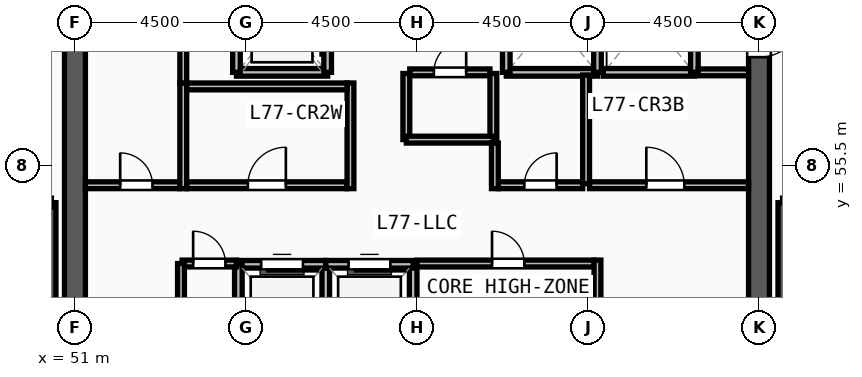
"""IFC4 building model, lengths in metres.
Left out: names, types, materials, properties, quantities, classifications, styles, units other than length and angle.
Written with IfcOpenShell. Run it as: python <this file> out.ifc"""

import sys

from ifc_helpers import new_model, si_unit, direction, frame, frame_2d, origin, place, context, subcontext, project, spatial, rectangle, extrude, source, transform, mapped, element, fill, save


model = new_model("IFC4")
c1 = context("Model", 3, precision=1e-05, world=origin(), true_north=direction((0.0, 1.0)))
c2 = subcontext(c1, "Body", "Model", "MODEL_VIEW")
j1 = project(units=[si_unit("LENGTHUNIT", "METRE"), si_unit("PLANEANGLEUNIT", "RADIAN")], contexts=[c1])
p1 = place(None, origin())
s1 = spatial("IfcSite", under=j1, at=p1, CompositionType="ELEMENT")
p2 = place(p1, origin())
s2 = spatial("IfcBuilding", under=s1, at=p2, CompositionType="ELEMENT")
p3 = place(p2, frame((0.0, 0.0, 297.75)))
s3 = spatial("IfcBuildingStorey", under=s2, at=p3, CompositionType="ELEMENT", Elevation=297.75)
p4 = place(p3, frame((69.0, 60.9, 0.0), z_axis=(0.0, 0.0, 1.0), x_axis=(0.0, -1.0, 0.0)))
e1 = element("IfcWall", 1, at=p4, inside=s3, PredefinedType="SHEAR", context=c2, shape_type="SweptSolid", body=[
    extrude(rectangle(XDim=13.8, YDim=0.55, at=frame_2d((6.9, 0.0))), origin(), (0.0, 0.0, 1.0), 3.57),
])
m1 = source(origin(), c2, "Body", "SweptSolid", [
    extrude(rectangle(XDim=1.2, YDim=2.2, at=frame_2d((0.6, 1.1))), frame((0.0, 0.285, 0.0), z_axis=(0.0, -1.0, 0.0), x_axis=(1.0, 0.0, 0.0)), (0.0, 0.0, 1.0), 0.57),
])
p5 = place(p4, frame((1.35, 0.0, 0.0)))
e2 = element("IfcOpeningElement", 2, at=p5, cuts=e1, PredefinedType="OPENING", context=c2, shape_type="MappedRepresentation", body=[
    mapped(m1, transform((0.0, 0.0, 0.0), x_axis=(1.0, 0.0, 0.0), y_axis=(0.0, 1.0, 0.0), z_axis=(0.0, 0.0, 1.0), scale=1.0)),
])
p6 = place(p3, frame((51.0, 47.1, 0.0), z_axis=(0.0, 0.0, 1.0), x_axis=(0.0, 1.0, 0.0)))
e3 = element("IfcWall", 3, at=p6, inside=s3, PredefinedType="SHEAR", context=c2, shape_type="SweptSolid", body=[
    extrude(rectangle(XDim=13.8, YDim=0.55, at=frame_2d((6.9, 0.0))), origin(), (0.0, 0.0, 1.0), 3.57),
])
for number, where, z_axis, x_axis in (
    (4, (50.38, 46.7, 0.0), (0.0, 0.0, 1.0), (0.0, 1.0, 0.0)),
    (5, (69.62, 54.52, 0.0), (0.0, 0.0, 1.0), (0.0, -1.0, 0.0)),
):
    element("IfcWall", number, at=place(p3, frame(where, z_axis=z_axis, x_axis=x_axis)), inside=s3, PredefinedType="SOLIDWALL", context=c2, shape_type="SweptSolid", body=[
        extrude(rectangle(XDim=7.82, YDim=0.24, at=frame_2d((3.91, 0.0))), origin(), (0.0, 0.0, 1.0), 3.57),
    ])
p7 = place(p3, frame((55.25, 57.95, 0.0), z_axis=(0.0, 0.0, 1.0), x_axis=(1.0, 0.0, 0.0)))
e6 = element("IfcWall", 6, at=p7, inside=s3, PredefinedType="SOLIDWALL", context=c2, shape_type="SweptSolid", body=[
    extrude(rectangle(XDim=2.4, YDim=0.2, at=frame_2d((1.2, 0.0))), origin(), (0.0, 0.0, 1.0), 3.57),
])
p8 = place(p3, frame((57.65, 57.95, 0.0), z_axis=(0.0, 0.0, 1.0), x_axis=(0.0, 1.0, 0.0)))
e7 = element("IfcWall", 7, at=p8, inside=s3, PredefinedType="SOLIDWALL", context=c2, shape_type="SweptSolid", body=[
    extrude(rectangle(XDim=2.93, YDim=0.2, at=frame_2d((1.465, 0.0))), origin(), (0.0, 0.0, 1.0), 3.57),
])
m2 = source(origin(), c2, "Body", "SweptSolid", [
    extrude(rectangle(XDim=1.2, YDim=2.3, at=frame_2d((0.6, 1.15))), frame((0.0, 0.11, 0.0), z_axis=(0.0, -1.0, 0.0), x_axis=(1.0, 0.0, 0.0)), (0.0, 0.0, 1.0), 0.22),
])
p9 = place(p8, frame((0.865, 0.0, 0.0)))
e8 = element("IfcOpeningElement", 8, at=p9, cuts=e7, PredefinedType="OPENING", context=c2, shape_type="MappedRepresentation", body=[
    mapped(m2, transform((0.0, 0.0, 0.0), x_axis=(1.0, 0.0, 0.0), y_axis=(0.0, 1.0, 0.0), z_axis=(0.0, 0.0, 1.0), scale=1.0)),
])
p10 = place(p3, frame((55.25, 60.88, 0.0), z_axis=(0.0, 0.0, 1.0), x_axis=(0.0, -1.0, 0.0)))
e9 = element("IfcWall", 9, at=p10, inside=s3, PredefinedType="SOLIDWALL", context=c2, shape_type="SweptSolid", body=[
    extrude(rectangle(XDim=2.93, YDim=0.2, at=frame_2d((1.465, 0.0))), origin(), (0.0, 0.0, 1.0), 3.57),
])
p11 = place(p3, frame((62.35, 57.95, 0.0), z_axis=(0.0, 0.0, 1.0), x_axis=(1.0, 0.0, 0.0)))
e10 = element("IfcWall", 10, at=p11, inside=s3, PredefinedType="SOLIDWALL", context=c2, shape_type="SweptSolid", body=[
    extrude(rectangle(XDim=2.4, YDim=0.2, at=frame_2d((1.2, 0.0))), origin(), (0.0, 0.0, 1.0), 3.57),
])
for number, where, z_axis, x_axis in (
    (11, (64.75, 57.95, 0.0), (0.0, 0.0, 1.0), (0.0, 1.0, 0.0)),
    (12, (62.35, 60.88, 0.0), (0.0, 0.0, 1.0), (0.0, -1.0, 0.0)),
):
    element("IfcWall", number, at=place(p3, frame(where, z_axis=z_axis, x_axis=x_axis)), inside=s3, PredefinedType="SOLIDWALL", context=c2, shape_type="SweptSolid", body=[
        extrude(rectangle(XDim=2.93, YDim=0.2, at=frame_2d((1.465, 0.0))), origin(), (0.0, 0.0, 1.0), 3.57),
    ])
p12 = place(p3, frame((64.9, 57.95, 0.0), z_axis=(0.0, 0.0, 1.0), x_axis=(1.0, 0.0, 0.0)))
e13 = element("IfcWall", 13, at=p12, inside=s3, PredefinedType="SOLIDWALL", context=c2, shape_type="SweptSolid", body=[
    extrude(rectangle(XDim=2.4, YDim=0.2, at=frame_2d((1.2, 0.0))), origin(), (0.0, 0.0, 1.0), 3.57),
])
p13 = place(p3, frame((67.3, 57.95, 0.0), z_axis=(0.0, 0.0, 1.0), x_axis=(0.0, 1.0, 0.0)))
e14 = element("IfcWall", 14, at=p13, inside=s3, PredefinedType="SOLIDWALL", context=c2, shape_type="SweptSolid", body=[
    extrude(rectangle(XDim=2.93, YDim=0.2, at=frame_2d((1.465, 0.0))), origin(), (0.0, 0.0, 1.0), 3.57),
])
p14 = place(p3, frame((57.6, 50.3, 0.0), z_axis=(0.0, 0.0, 1.0), x_axis=(0.0, 1.0, 0.0)))
e15 = element("IfcWall", 15, at=p14, inside=s3, PredefinedType="SOLIDWALL", context=c2, shape_type="SweptSolid", body=[
    extrude(rectangle(XDim=2.6, YDim=0.2, at=frame_2d((1.3, 0.0))), origin(), (0.0, 0.0, 1.0), 3.57),
])
p15 = place(p3, frame((57.6, 52.9, 0.0), z_axis=(0.0, 0.0, 1.0), x_axis=(-1.0, 0.0, 0.0)))
e16 = element("IfcWall", 16, at=p15, inside=s3, PredefinedType="SOLIDWALL", context=c2, shape_type="SweptSolid", body=[
    extrude(rectangle(XDim=2.3, YDim=0.2, at=frame_2d((1.15, 0.0))), origin(), (0.0, 0.0, 1.0), 3.57),
])
m3 = source(origin(), c2, "Body", "SweptSolid", [
    extrude(rectangle(XDim=1.1, YDim=2.2, at=frame_2d((0.55, 1.1))), frame((0.0, 0.11, 0.0), z_axis=(0.0, -1.0, 0.0), x_axis=(1.0, 0.0, 0.0)), (0.0, 0.0, 1.0), 0.22),
])
p16 = place(p15, frame((0.6, 0.0, 0.0)))
e17 = element("IfcOpeningElement", 17, at=p16, cuts=e16, PredefinedType="OPENING", context=c2, shape_type="MappedRepresentation", body=[
    mapped(m3, transform((0.0, 0.0, 0.0), x_axis=(1.0, 0.0, 0.0), y_axis=(0.0, 1.0, 0.0), z_axis=(0.0, 0.0, 1.0), scale=1.0)),
])
for number, where, z_axis, x_axis in (
    (18, (55.3, 52.9, 0.0), (0.0, 0.0, 1.0), (0.0, -1.0, 0.0)),
    (19, (59.9, 50.3, 0.0), (0.0, 0.0, 1.0), (0.0, 1.0, 0.0)),
):
    element("IfcWall", number, at=place(p3, frame(where, z_axis=z_axis, x_axis=x_axis)), inside=s3, PredefinedType="SOLIDWALL", context=c2, shape_type="SweptSolid", body=[
        extrude(rectangle(XDim=2.6, YDim=0.2, at=frame_2d((1.3, 0.0))), origin(), (0.0, 0.0, 1.0), 3.57),
    ])
p17 = place(p3, frame((59.9, 52.9, 0.0), z_axis=(0.0, 0.0, 1.0), x_axis=(-1.0, 0.0, 0.0)))
e20 = element("IfcWall", 20, at=p17, inside=s3, PredefinedType="SOLIDWALL", context=c2, shape_type="SweptSolid", body=[
    extrude(rectangle(XDim=2.3, YDim=0.2, at=frame_2d((1.15, 0.0))), origin(), (0.0, 0.0, 1.0), 3.57),
])
p18 = place(p17, frame((0.6, 0.0, 0.0)))
e21 = element("IfcOpeningElement", 21, at=p18, cuts=e20, PredefinedType="OPENING", context=c2, shape_type="MappedRepresentation", body=[
    mapped(m3, transform((0.0, 0.0, 0.0), x_axis=(1.0, 0.0, 0.0), y_axis=(0.0, 1.0, 0.0), z_axis=(0.0, 0.0, 1.0), scale=1.0)),
])
p19 = place(p3, frame((60.0, 52.92, 0.0), z_axis=(0.0, 0.0, 1.0), x_axis=(1.0, 0.0, 0.0)))
e22 = element("IfcWall", 22, at=p19, inside=s3, PredefinedType="PARTITIONING", context=c2, shape_type="SweptSolid", body=[
    extrude(rectangle(XDim=4.66, YDim=0.18, at=frame_2d((2.33, 0.0))), origin(), (0.0, 0.0, 1.0), 3.57),
])
m4 = source(origin(), c2, "Body", "SweptSolid", [
    extrude(rectangle(XDim=0.85, YDim=2.1, at=frame_2d((0.425, 1.05))), frame((0.0, 0.1, 0.0), z_axis=(0.0, -1.0, 0.0), x_axis=(1.0, 0.0, 0.0)), (0.0, 0.0, 1.0), 0.2),
])
p20 = place(p19, frame((1.975, 0.0, 0.0)))
e23 = element("IfcOpeningElement", 23, at=p20, cuts=e22, PredefinedType="OPENING", context=c2, shape_type="MappedRepresentation", body=[
    mapped(m4, transform((0.0, 0.0, 0.0), x_axis=(1.0, 0.0, 0.0), y_axis=(0.0, 1.0, 0.0), z_axis=(0.0, 0.0, 1.0), scale=1.0)),
])
p21 = place(p3, frame((53.94, 54.98, 0.0), z_axis=(0.0, 0.0, 1.0), x_axis=(1.0, 0.0, 0.0)))
e24 = element("IfcWall", 24, at=p21, inside=s3, PredefinedType="PARTITIONING", context=c2, shape_type="SweptSolid", body=[
    extrude(rectangle(XDim=4.22, YDim=0.18, at=frame_2d((2.11, 0.0))), origin(), (0.0, 0.0, 1.0), 3.57),
])
m5 = source(origin(), c2, "Body", "SweptSolid", [
    extrude(rectangle(XDim=1.0, YDim=2.2, at=frame_2d((0.5, 1.1))), frame((0.0, 0.1, 0.0), z_axis=(0.0, -1.0, 0.0), x_axis=(1.0, 0.0, 0.0)), (0.0, 0.0, 1.0), 0.2),
])
p22 = place(p21, frame((1.61, 0.0, 0.0)))
e25 = element("IfcOpeningElement", 25, at=p22, cuts=e24, PredefinedType="OPENING", context=c2, shape_type="MappedRepresentation", body=[
    mapped(m5, transform((0.0, 0.0, 0.0), x_axis=(1.0, 0.0, 0.0), y_axis=(0.0, 1.0, 0.0), z_axis=(0.0, 0.0, 1.0), scale=1.0)),
])
p23 = place(p3, frame((51.275, 54.98, 0.0), z_axis=(0.0, 0.0, 1.0), x_axis=(1.0, 0.0, 0.0)))
e26 = element("IfcWall", 26, at=p23, inside=s3, PredefinedType="PARTITIONING", context=c2, shape_type="SweptSolid", body=[
    extrude(rectangle(XDim=2.485, YDim=0.18, at=frame_2d((1.243, 0.0))), origin(), (0.0, 0.0, 1.0), 3.57),
])
p24 = place(p23, frame((0.915, 0.0, 0.0)))
e27 = element("IfcOpeningElement", 27, at=p24, cuts=e26, PredefinedType="OPENING", context=c2, shape_type="MappedRepresentation", body=[
    mapped(m4, transform((0.0, 0.0, 0.0), x_axis=(1.0, 0.0, 0.0), y_axis=(0.0, 1.0, 0.0), z_axis=(0.0, 0.0, 1.0), scale=1.0)),
])
p25 = place(p3, frame((62.14, 54.98, 0.0), z_axis=(0.0, 0.0, 1.0), x_axis=(1.0, 0.0, 0.0)))
e28 = element("IfcWall", 28, at=p25, inside=s3, PredefinedType="PARTITIONING", context=c2, shape_type="SweptSolid", body=[
    extrude(rectangle(XDim=2.22, YDim=0.18, at=frame_2d((1.11, 0.0))), origin(), (0.0, 0.0, 1.0), 3.57),
])
p26 = place(p25, frame((0.685, 0.0, 0.0)))
e29 = element("IfcOpeningElement", 29, at=p26, cuts=e28, PredefinedType="OPENING", context=c2, shape_type="MappedRepresentation", body=[
    mapped(m4, transform((0.0, 0.0, 0.0), x_axis=(1.0, 0.0, 0.0), y_axis=(0.0, 1.0, 0.0), z_axis=(0.0, 0.0, 1.0), scale=1.0)),
])
p27 = place(p3, frame((64.54, 54.98, 0.0), z_axis=(0.0, 0.0, 1.0), x_axis=(1.0, 0.0, 0.0)))
e30 = element("IfcWall", 30, at=p27, inside=s3, PredefinedType="PARTITIONING", context=c2, shape_type="SweptSolid", body=[
    extrude(rectangle(XDim=4.185, YDim=0.18, at=frame_2d((2.093, 0.0))), origin(), (0.0, 0.0, 1.0), 3.57),
])
p28 = place(p27, frame((1.495, 0.0, 0.0)))
e31 = element("IfcOpeningElement", 31, at=p28, cuts=e30, PredefinedType="OPENING", context=c2, shape_type="MappedRepresentation", body=[
    mapped(m5, transform((0.0, 0.0, 0.0), x_axis=(1.0, 0.0, 0.0), y_axis=(0.0, 1.0, 0.0), z_axis=(0.0, 0.0, 1.0), scale=1.0)),
])
p29 = place(p3, frame((59.81, 57.95, 0.0), z_axis=(0.0, 0.0, 1.0), x_axis=(1.0, 0.0, 0.0)))
e32 = element("IfcWall", 32, at=p29, inside=s3, PredefinedType="PARTITIONING", context=c2, shape_type="SweptSolid", body=[
    extrude(rectangle(XDim=2.11, YDim=0.18, at=frame_2d((1.055, 0.0))), origin(), (0.0, 0.0, 1.0), 3.57),
])
p30 = place(p29, frame((0.635, 0.0, 0.0)))
e33 = element("IfcOpeningElement", 33, at=p30, cuts=e32, PredefinedType="OPENING", context=c2, shape_type="MappedRepresentation", body=[
    mapped(m4, transform((0.0, 0.0, 0.0), x_axis=(1.0, 0.0, 0.0), y_axis=(0.0, 1.0, 0.0), z_axis=(0.0, 0.0, 1.0), scale=1.0)),
])
p31 = place(p3, frame((53.82, 52.92, 0.0), z_axis=(0.0, 0.0, 1.0), x_axis=(1.0, 0.0, 0.0)))
e34 = element("IfcWall", 34, at=p31, inside=s3, PredefinedType="PARTITIONING", context=c2, shape_type="SweptSolid", body=[
    extrude(rectangle(XDim=1.43, YDim=0.18, at=frame_2d((0.715, 0.0))), origin(), (0.0, 0.0, 1.0), 3.57),
])
p32 = place(p31, frame((0.29, 0.0, 0.0)))
e35 = element("IfcOpeningElement", 35, at=p32, cuts=e34, PredefinedType="OPENING", context=c2, shape_type="MappedRepresentation", body=[
    mapped(m4, transform((0.0, 0.0, 0.0), x_axis=(1.0, 0.0, 0.0), y_axis=(0.0, 1.0, 0.0), z_axis=(0.0, 0.0, 1.0), scale=1.0)),
])
p33 = place(p3, frame((64.45, 55.02, 0.0), z_axis=(0.0, 0.0, 1.0), x_axis=(0.0, 1.0, 0.0)))
e36 = element("IfcWall", 36, at=p33, inside=s3, PredefinedType="PARTITIONING", context=c2, shape_type="SweptSolid", body=[
    extrude(rectangle(XDim=2.86, YDim=0.18, at=frame_2d((1.43, 0.0))), origin(), (0.0, 0.0, 1.0), 3.57),
])
for number, where, z_axis, x_axis in (
    (37, (59.72, 56.18, 0.0), (0.0, 0.0, 1.0), (0.0, 1.0, 0.0)),
    (38, (62.01, 56.18, 0.0), (0.0, 0.0, 1.0), (0.0, 1.0, 0.0)),
):
    element("IfcWall", number, at=place(p3, frame(where, z_axis=z_axis, x_axis=x_axis)), inside=s3, PredefinedType="PARTITIONING", context=c2, shape_type="SweptSolid", body=[
        extrude(rectangle(XDim=1.74, YDim=0.18, at=frame_2d((0.87, 0.0))), origin(), (0.0, 0.0, 1.0), 3.57),
    ])
p34 = place(p3, frame((59.72, 56.18, 0.0), z_axis=(0.0, 0.0, 1.0), x_axis=(1.0, 0.0, 0.0)))
e39 = element("IfcWall", 39, at=p34, inside=s3, PredefinedType="PARTITIONING", context=c2, shape_type="SweptSolid", body=[
    extrude(rectangle(XDim=2.29, YDim=0.18, at=frame_2d((1.145, 0.0))), origin(), (0.0, 0.0, 1.0), 3.57),
])
p35 = place(p3, frame((53.79, 50.35, 0.0), z_axis=(0.0, 0.0, 1.0), x_axis=(0.0, 1.0, 0.0)))
e40 = element("IfcWall", 40, at=p35, inside=s3, PredefinedType="PARTITIONING", context=c2, shape_type="SweptSolid", body=[
    extrude(rectangle(XDim=2.57, YDim=0.18, at=frame_2d((1.285, 0.0))), origin(), (0.0, 0.0, 1.0), 3.57),
])
p36 = place(p3, frame((64.75, 50.22, 0.0), z_axis=(0.0, 0.0, 1.0), x_axis=(0.0, 1.0, 0.0)))
e41 = element("IfcWall", 41, at=p36, inside=s3, PredefinedType="PARTITIONING", context=c2, shape_type="SweptSolid", body=[
    extrude(rectangle(XDim=2.79, YDim=0.18, at=frame_2d((1.395, 0.0))), origin(), (0.0, 0.0, 1.0), 3.57),
])
for number, where, z_axis, x_axis in (
    (42, (53.85, 54.89, 0.0), (0.0, 0.0, 1.0), (0.0, 1.0, 0.0)),
    (43, (58.25, 54.89, 0.0), (0.0, 0.0, 1.0), (0.0, 1.0, 0.0)),
):
    element("IfcWall", number, at=place(p3, frame(where, z_axis=z_axis, x_axis=x_axis)), inside=s3, PredefinedType="PARTITIONING", context=c2, shape_type="SweptSolid", body=[
        extrude(rectangle(XDim=2.78, YDim=0.18, at=frame_2d((1.39, 0.0))), origin(), (0.0, 0.0, 1.0), 3.57),
    ])
p37 = place(p3, frame((53.94, 57.58, 0.0), z_axis=(0.0, 0.0, 1.0), x_axis=(1.0, 0.0, 0.0)))
e44 = element("IfcWall", 44, at=p37, inside=s3, PredefinedType="PARTITIONING", context=c2, shape_type="SweptSolid", body=[
    extrude(rectangle(XDim=4.22, YDim=0.18, at=frame_2d((2.11, 0.0))), origin(), (0.0, 0.0, 1.0), 3.57),
])
p38 = place(p3, frame((53.85, 57.67, 0.0), z_axis=(0.0, 0.0, 1.0), x_axis=(0.0, 1.0, 0.0)))
e45 = element("IfcWall", 45, at=p38, inside=s3, PredefinedType="PARTITIONING", context=c2, shape_type="SweptSolid", body=[
    extrude(rectangle(XDim=3.42, YDim=0.18, at=frame_2d((1.71, 0.0))), origin(), (0.0, 0.0, 1.0), 3.57),
])
p39 = place(p3, frame((62.05, 54.89, 0.0), z_axis=(0.0, 0.0, 1.0), x_axis=(0.0, 1.0, 0.0)))
e46 = element("IfcWall", 46, at=p39, inside=s3, PredefinedType="PARTITIONING", context=c2, shape_type="SweptSolid", body=[
    extrude(rectangle(XDim=1.2, YDim=0.18, at=frame_2d((0.6, 0.0))), origin(), (0.0, 0.0, 1.0), 3.57),
])
p40 = place(p3, frame((67.4, 57.95, 0.0), z_axis=(0.0, 0.0, 1.0), x_axis=(1.0, 0.0, 0.0)))
e47 = element("IfcWall", 47, at=p40, inside=s3, PredefinedType="PARTITIONING", context=c2, shape_type="SweptSolid", body=[
    extrude(rectangle(XDim=1.325, YDim=0.18, at=frame_2d((0.663, 0.0))), origin(), (0.0, 0.0, 1.0), 3.57),
])
m6 = source(origin(), c2, "Body", "SweptSolid", [
    extrude(rectangle(XDim=1.2, YDim=2.2, at=frame_2d((0.6, 1.1))), frame((0.0, 0.025, 0.0), z_axis=(0.0, -1.0, 0.0), x_axis=(1.0, 0.0, 0.0)), (0.0, 0.0, 1.0), 0.05),
])
p41 = place(p5, origin())
e48 = element("IfcDoor", 48, at=p41, inside=s3, OperationType="SINGLE_SWING_LEFT", PredefinedType="DOOR", context=c2, shape_type="MappedRepresentation", body=[
    mapped(m6, transform((0.0, 0.0, 0.0), x_axis=(1.0, 0.0, 0.0), y_axis=(0.0, 1.0, 0.0), z_axis=(0.0, 0.0, 1.0), scale=1.0)),
])
fill(e2, e48)
m7 = source(origin(), c2, "Body", "SweptSolid", [
    extrude(rectangle(XDim=1.1, YDim=2.2, at=frame_2d((0.55, 1.1))), frame((0.0, 0.025, 0.0), z_axis=(0.0, -1.0, 0.0), x_axis=(1.0, 0.0, 0.0)), (0.0, 0.0, 1.0), 0.05),
])
p42 = place(p16, origin())
e49 = element("IfcDoor", 49, at=p42, inside=s3, OperationType="SLIDING_TO_LEFT", PredefinedType="DOOR", context=c2, shape_type="MappedRepresentation", body=[
    mapped(m7, transform((0.0, 0.0, 0.0), x_axis=(1.0, 0.0, 0.0), y_axis=(0.0, 1.0, 0.0), z_axis=(0.0, 0.0, 1.0), scale=1.0)),
])
fill(e17, e49)
p43 = place(p18, origin())
e50 = element("IfcDoor", 50, at=p43, inside=s3, OperationType="SLIDING_TO_LEFT", PredefinedType="DOOR", context=c2, shape_type="MappedRepresentation", body=[
    mapped(m7, transform((0.0, 0.0, 0.0), x_axis=(1.0, 0.0, 0.0), y_axis=(0.0, 1.0, 0.0), z_axis=(0.0, 0.0, 1.0), scale=1.0)),
])
fill(e21, e50)
m8 = source(origin(), c2, "Body", "SweptSolid", [
    extrude(rectangle(XDim=0.85, YDim=2.1, at=frame_2d((0.425, 1.05))), frame((0.0, 0.025, 0.0), z_axis=(0.0, -1.0, 0.0), x_axis=(1.0, 0.0, 0.0)), (0.0, 0.0, 1.0), 0.05),
])
p44 = place(p20, origin())
e51 = element("IfcDoor", 51, at=p44, inside=s3, OperationType="SINGLE_SWING_LEFT", PredefinedType="DOOR", context=c2, shape_type="MappedRepresentation", body=[
    mapped(m8, transform((0.0, 0.0, 0.0), x_axis=(1.0, 0.0, 0.0), y_axis=(0.0, 1.0, 0.0), z_axis=(0.0, 0.0, 1.0), scale=1.0)),
])
fill(e23, e51)
m9 = source(origin(), c2, "Body", "SweptSolid", [
    extrude(rectangle(XDim=1.0, YDim=2.2, at=frame_2d((0.5, 1.1))), frame((0.0, 0.025, 0.0), z_axis=(0.0, -1.0, 0.0), x_axis=(1.0, 0.0, 0.0)), (0.0, 0.0, 1.0), 0.05),
])
p45 = place(p22, origin())
e52 = element("IfcDoor", 52, at=p45, inside=s3, OperationType="SINGLE_SWING_RIGHT", PredefinedType="DOOR", context=c2, shape_type="MappedRepresentation", body=[
    mapped(m9, transform((0.0, 0.0, 0.0), x_axis=(1.0, 0.0, 0.0), y_axis=(0.0, 1.0, 0.0), z_axis=(0.0, 0.0, 1.0), scale=1.0)),
])
fill(e25, e52)
p46 = place(p24, origin())
e53 = element("IfcDoor", 53, at=p46, inside=s3, OperationType="SINGLE_SWING_LEFT", PredefinedType="DOOR", context=c2, shape_type="MappedRepresentation", body=[
    mapped(m8, transform((0.0, 0.0, 0.0), x_axis=(1.0, 0.0, 0.0), y_axis=(0.0, 1.0, 0.0), z_axis=(0.0, 0.0, 1.0), scale=1.0)),
])
fill(e27, e53)
p47 = place(p26, origin())
e54 = element("IfcDoor", 54, at=p47, inside=s3, OperationType="SINGLE_SWING_RIGHT", PredefinedType="DOOR", context=c2, shape_type="MappedRepresentation", body=[
    mapped(m8, transform((0.0, 0.0, 0.0), x_axis=(1.0, 0.0, 0.0), y_axis=(0.0, 1.0, 0.0), z_axis=(0.0, 0.0, 1.0), scale=1.0)),
])
fill(e29, e54)
p48 = place(p28, origin())
e55 = element("IfcDoor", 55, at=p48, inside=s3, OperationType="SINGLE_SWING_LEFT", PredefinedType="DOOR", context=c2, shape_type="MappedRepresentation", body=[
    mapped(m9, transform((0.0, 0.0, 0.0), x_axis=(1.0, 0.0, 0.0), y_axis=(0.0, 1.0, 0.0), z_axis=(0.0, 0.0, 1.0), scale=1.0)),
])
fill(e31, e55)
p49 = place(p30, origin())
e56 = element("IfcDoor", 56, at=p49, inside=s3, OperationType="SINGLE_SWING_RIGHT", PredefinedType="DOOR", context=c2, shape_type="MappedRepresentation", body=[
    mapped(m8, transform((0.0, 0.0, 0.0), x_axis=(1.0, 0.0, 0.0), y_axis=(0.0, 1.0, 0.0), z_axis=(0.0, 0.0, 1.0), scale=1.0)),
])
fill(e33, e56)
p50 = place(p32, origin())
e57 = element("IfcDoor", 57, at=p50, inside=s3, OperationType="SINGLE_SWING_LEFT", PredefinedType="DOOR", context=c2, shape_type="MappedRepresentation", body=[
    mapped(m8, transform((0.0, 0.0, 0.0), x_axis=(1.0, 0.0, 0.0), y_axis=(0.0, 1.0, 0.0), z_axis=(0.0, 0.0, 1.0), scale=1.0)),
])
fill(e35, e57)
save(model, sys.argv[1])
